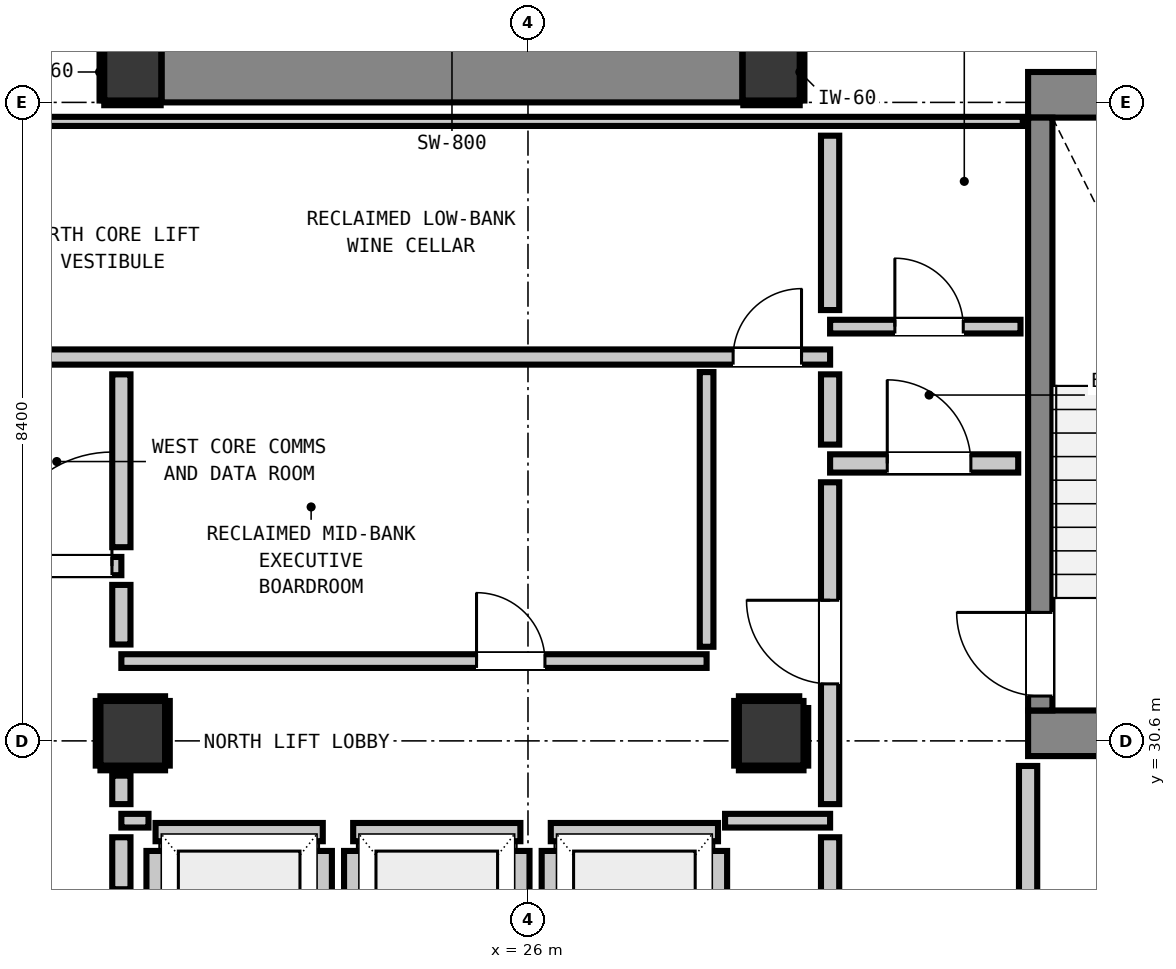
"""IFC4 building model, lengths in metres.
Left out: names, types, materials, properties, quantities, classifications, styles, units other than length and angle.
Written with IfcOpenShell. Run it as: python <this file> out.ifc"""

import sys

from ifc_helpers import new_model, si_unit, direction, frame, frame_2d, origin, origin_2d, place, context, subcontext, project, spatial, rectangle, extrude, element, fill, save


model = new_model("IFC4")
c1 = context("Model", 3, precision=1e-05, world=origin(), true_north=direction((0.0, 1.0)))
c2 = subcontext(c1, "Body", "Model", "MODEL_VIEW")
j1 = project(units=[si_unit("LENGTHUNIT", "METRE"), si_unit("PLANEANGLEUNIT", "RADIAN")], contexts=[c1])
p1 = place(None, origin())
s1 = spatial("IfcSite", under=j1, at=p1, CompositionType="ELEMENT")
p2 = place(p1, origin())
s2 = spatial("IfcBuilding", under=s1, at=p2, CompositionType="ELEMENT")
p3 = place(p2, frame((0.0, 0.0, 234.6)))
s3 = spatial("IfcBuildingStorey", under=s2, at=p3, CompositionType="ELEMENT", Elevation=234.6)
for number, where, z_axis, x_axis in (
    (1, (20.8, 39.4, 0.0), (0.0, 0.0, 1.0), (1.0, 0.0, 0.0)),
    (2, (29.2, 39.4, 0.0), (0.0, 0.0, 1.0), (1.0, 0.0, 0.0)),
):
    element("IfcColumn", number, at=place(p3, frame(where, z_axis=z_axis, x_axis=x_axis)), inside=s3, PredefinedType="COLUMN", context=c2, shape_type="SweptSolid", body=[
        extrude(rectangle(XDim=0.75, YDim=0.75, at=origin_2d()), origin(), (0.0, 0.0, 1.0), 3.32),
    ])
p4 = place(p3, frame((32.58, 39.1, 0.0), z_axis=(0.0, 0.0, 1.0), x_axis=(1.0, 0.0, 0.0)))
e3 = element("IfcWall", 3, at=p4, inside=s3, PredefinedType="SHEAR", context=c2, shape_type="SweptSolid", body=[
    extrude(rectangle(XDim=4.08, YDim=0.6, at=frame_2d((2.04, 0.0))), origin(), (0.0, 0.0, 1.0), 3.32),
])
p5 = place(p3, frame((32.58, 30.7, 0.0), z_axis=(0.0, 0.0, 1.0), x_axis=(1.0, 0.0, 0.0)))
e4 = element("IfcWall", 4, at=p5, inside=s3, PredefinedType="SHEAR", context=c2, shape_type="SweptSolid", body=[
    extrude(rectangle(XDim=3.54, YDim=0.6, at=frame_2d((1.77, 0.0))), origin(), (0.0, 0.0, 1.0), 3.32),
])
p6 = place(p3, frame((21.18, 39.4, 0.0), z_axis=(0.0, 0.0, 1.0), x_axis=(1.0, 0.0, 0.0)))
e5 = element("IfcWall", 5, at=p6, inside=s3, PredefinedType="SHEAR", context=c2, shape_type="SweptSolid", body=[
    extrude(rectangle(XDim=7.64, YDim=0.8, at=frame_2d((3.82, 0.0))), origin(), (0.0, 0.0, 1.0), 3.32),
])
p7 = place(p3, frame((32.74, 31.0, 0.0), z_axis=(0.0, 0.0, 1.0), x_axis=(0.0, 1.0, 0.0)))
e6 = element("IfcWall", 6, at=p7, inside=s3, PredefinedType="SHEAR", context=c2, shape_type="SweptSolid", body=[
    extrude(rectangle(XDim=7.8, YDim=0.32, at=frame_2d((3.9, 0.0))), origin(), (0.0, 0.0, 1.0), 3.32),
])
p8 = place(p7, frame((0.19, 0.0, 0.0)))
e7 = element("IfcOpeningElement", 7, at=p8, cuts=e6, PredefinedType="OPENING", context=c2, shape_type="SweptSolid", body=[
    extrude(rectangle(XDim=1.1, YDim=2.15, at=frame_2d((0.55, 1.075))), frame((0.0, 0.17, 0.0), z_axis=(0.0, -1.0, 0.0), x_axis=(1.0, 0.0, 0.0)), (0.0, 0.0, 1.0), 0.34),
])
for number, where, z_axis, x_axis in (
    (8, (20.8, 30.7, 0.0), (0.0, 0.0, 1.0), (1.0, 0.0, 0.0)),
    (9, (29.2, 30.7, 0.0), (0.0, 0.0, 1.0), (1.0, 0.0, 0.0)),
):
    element("IfcColumn", number, at=place(p3, frame(where, z_axis=z_axis, x_axis=x_axis)), inside=s3, PredefinedType="COLUMN", context=c2, shape_type="SweptSolid", body=[
        extrude(rectangle(XDim=0.85, YDim=0.85, at=origin_2d()), origin(), (0.0, 0.0, 1.0), 3.32),
    ])
p9 = place(p3, frame((21.1, 29.4, 0.0), z_axis=(0.0, 0.0, 1.0), x_axis=(1.0, 0.0, 0.0)))
e10 = element("IfcWall", 10, at=p9, inside=s3, PredefinedType="PARTITIONING", context=c2, shape_type="SweptSolid", body=[
    extrude(rectangle(XDim=2.2, YDim=0.24, at=frame_2d((1.1, 0.0))), origin(), (0.0, 0.0, 1.0), 3.1),
])
p10 = place(p3, frame((21.1, 27.048, 0.0), z_axis=(0.0, 0.0, 1.0), x_axis=(0.0, 1.0, 0.0)))
e11 = element("IfcWall", 11, at=p10, inside=s3, PredefinedType="PARTITIONING", context=c2, shape_type="SweptSolid", body=[
    extrude(rectangle(XDim=2.104, YDim=0.24, at=frame_2d((1.052, 0.0))), origin(), (0.0, 0.0, 1.0), 2.335),
])
p11 = place(p3, frame((23.3, 27.048, 0.0), z_axis=(0.0, 0.0, 1.0), x_axis=(0.0, 1.0, 0.0)))
e12 = element("IfcWall", 12, at=p11, inside=s3, PredefinedType="PARTITIONING", context=c2, shape_type="SweptSolid", body=[
    extrude(rectangle(XDim=2.104, YDim=0.24, at=frame_2d((1.052, 0.0))), origin(), (0.0, 0.0, 1.0), 3.1),
])
p12 = place(p3, frame((23.7, 29.4, 0.0), z_axis=(0.0, 0.0, 1.0), x_axis=(1.0, 0.0, 0.0)))
e13 = element("IfcWall", 13, at=p12, inside=s3, PredefinedType="PARTITIONING", context=c2, shape_type="SweptSolid", body=[
    extrude(rectangle(XDim=2.2, YDim=0.24, at=frame_2d((1.1, 0.0))), origin(), (0.0, 0.0, 1.0), 3.1),
])
for number, where, z_axis, x_axis in (
    (14, (23.7, 27.048, 0.0), (0.0, 0.0, 1.0), (0.0, 1.0, 0.0)),
    (15, (25.9, 27.048, 0.0), (0.0, 0.0, 1.0), (0.0, 1.0, 0.0)),
):
    element("IfcWall", number, at=place(p3, frame(where, z_axis=z_axis, x_axis=x_axis)), inside=s3, PredefinedType="PARTITIONING", context=c2, shape_type="SweptSolid", body=[
        extrude(rectangle(XDim=2.104, YDim=0.24, at=frame_2d((1.052, 0.0))), origin(), (0.0, 0.0, 1.0), 3.1),
    ])
p13 = place(p3, frame((26.3, 29.4, 0.0), z_axis=(0.0, 0.0, 1.0), x_axis=(1.0, 0.0, 0.0)))
e16 = element("IfcWall", 16, at=p13, inside=s3, PredefinedType="PARTITIONING", context=c2, shape_type="SweptSolid", body=[
    extrude(rectangle(XDim=2.2, YDim=0.24, at=frame_2d((1.1, 0.0))), origin(), (0.0, 0.0, 1.0), 3.1),
])
p14 = place(p3, frame((26.3, 27.048, 0.0), z_axis=(0.0, 0.0, 1.0), x_axis=(0.0, 1.0, 0.0)))
e17 = element("IfcWall", 17, at=p14, inside=s3, PredefinedType="PARTITIONING", context=c2, shape_type="SweptSolid", body=[
    extrude(rectangle(XDim=2.104, YDim=0.24, at=frame_2d((1.052, 0.0))), origin(), (0.0, 0.0, 1.0), 3.1),
])
p15 = place(p3, frame((28.5, 27.33, 0.0), z_axis=(0.0, 0.0, 1.0), x_axis=(0.0, 1.0, 0.0)))
e18 = element("IfcWall", 18, at=p15, inside=s3, PredefinedType="PARTITIONING", context=c2, shape_type="SweptSolid", body=[
    extrude(rectangle(XDim=1.822, YDim=0.24, at=frame_2d((0.911, 0.0))), origin(), (0.0, 0.0, 1.0), 3.1),
])
p16 = place(p3, frame((17.45, 32.9, 0.0), z_axis=(0.0, 0.0, 1.0), x_axis=(1.0, 0.0, 0.0)))
e19 = element("IfcWall", 19, at=p16, inside=s3, PredefinedType="PARTITIONING", context=c2, shape_type="SweptSolid", body=[
    extrude(rectangle(XDim=3.2, YDim=0.24, at=frame_2d((1.6, 0.0))), origin(), (0.0, 0.0, 1.0), 3.1),
])
p17 = place(p16, frame((0.159, 0.0, 0.0)))
e20 = element("IfcOpeningElement", 20, at=p17, cuts=e19, PredefinedType="OPENING", context=c2, shape_type="SweptSolid", body=[
    extrude(rectangle(XDim=1.1, YDim=2.15, at=frame_2d((0.55, 1.075))), frame((0.0, 0.13, 0.0), z_axis=(0.0, -1.0, 0.0), x_axis=(1.0, 0.0, 0.0)), (0.0, 0.0, 1.0), 0.26),
])
p18 = place(p16, frame((1.576, 0.0, 0.0)))
e21 = element("IfcOpeningElement", 21, at=p18, cuts=e19, PredefinedType="OPENING", context=c2, shape_type="SweptSolid", body=[
    extrude(rectangle(XDim=1.5, YDim=2.15, at=frame_2d((0.75, 1.075))), frame((0.0, 0.13, 0.0), z_axis=(0.0, -1.0, 0.0), x_axis=(1.0, 0.0, 0.0)), (0.0, 0.0, 1.0), 0.26),
])
p19 = place(p3, frame((29.975, 34.25, 0.0), z_axis=(0.0, 0.0, 1.0), x_axis=(1.0, 0.0, 0.0)))
e22 = element("IfcWall", 22, at=p19, inside=s3, PredefinedType="PARTITIONING", context=c2, shape_type="SweptSolid", body=[
    extrude(rectangle(XDim=2.475, YDim=0.24, at=frame_2d((1.237, 0.0))), origin(), (0.0, 0.0, 1.0), 3.1),
])
p20 = place(p19, frame((0.752, 0.0, 0.0)))
e23 = element("IfcOpeningElement", 23, at=p20, cuts=e22, PredefinedType="OPENING", context=c2, shape_type="SweptSolid", body=[
    extrude(rectangle(XDim=1.1, YDim=2.15, at=frame_2d((0.55, 1.075))), frame((0.0, 0.13, 0.0), z_axis=(0.0, -1.0, 0.0), x_axis=(1.0, 0.0, 0.0)), (0.0, 0.0, 1.0), 0.26),
])
p21 = place(p3, frame((18.95, 35.65, 0.0), z_axis=(0.0, 0.0, 1.0), x_axis=(1.0, 0.0, 0.0)))
e24 = element("IfcWall", 24, at=p21, inside=s3, PredefinedType="PARTITIONING", context=c2, shape_type="SweptSolid", body=[
    extrude(rectangle(XDim=11.025, YDim=0.2, at=frame_2d((5.513, 0.0))), origin(), (0.0, 0.0, 1.0), 3.1),
])
p22 = place(p21, frame((9.749, 0.0, 0.0)))
e25 = element("IfcOpeningElement", 25, at=p22, cuts=e24, PredefinedType="OPENING", context=c2, shape_type="SweptSolid", body=[
    extrude(rectangle(XDim=0.9, YDim=2.1, at=frame_2d((0.45, 1.05))), frame((0.0, 0.11, 0.0), z_axis=(0.0, -1.0, 0.0), x_axis=(1.0, 0.0, 0.0)), (0.0, 0.0, 1.0), 0.22),
])
p23 = place(p3, frame((20.65, 29.55, 0.0), z_axis=(0.0, 0.0, 1.0), x_axis=(1.0, 0.0, 0.0)))
e26 = element("IfcWall", 26, at=p23, inside=s3, PredefinedType="PARTITIONING", context=c2, shape_type="SweptSolid", body=[
    extrude(rectangle(XDim=0.357, YDim=0.18, at=frame_2d((0.179, 0.0))), origin(), (0.0, 0.0, 1.0), 3.1),
])
p24 = place(p3, frame((28.593, 29.55, 0.0), z_axis=(0.0, 0.0, 1.0), x_axis=(1.0, 0.0, 0.0)))
e27 = element("IfcWall", 27, at=p24, inside=s3, PredefinedType="PARTITIONING", context=c2, shape_type="SweptSolid", body=[
    extrude(rectangle(XDim=1.382, YDim=0.18, at=frame_2d((0.691, 0.0))), origin(), (0.0, 0.0, 1.0), 3.1),
])
p25 = place(p3, frame((20.65, 31.65, 0.0), z_axis=(0.0, 0.0, 1.0), x_axis=(1.0, 0.0, 0.0)))
e28 = element("IfcWall", 28, at=p25, inside=s3, PredefinedType="PARTITIONING", context=c2, shape_type="SweptSolid", body=[
    extrude(rectangle(XDim=7.7, YDim=0.18, at=frame_2d((3.85, 0.0))), origin(), (0.0, 0.0, 1.0), 3.1),
])
p26 = place(p25, frame((4.673, 0.0, 0.0)))
e29 = element("IfcOpeningElement", 29, at=p26, cuts=e28, PredefinedType="OPENING", context=c2, shape_type="SweptSolid", body=[
    extrude(rectangle(XDim=0.9, YDim=2.1, at=frame_2d((0.45, 1.05))), frame((0.0, 0.1, 0.0), z_axis=(0.0, -1.0, 0.0), x_axis=(1.0, 0.0, 0.0)), (0.0, 0.0, 1.0), 0.2),
])
p27 = place(p3, frame((29.975, 36.05, 0.0), z_axis=(0.0, 0.0, 1.0), x_axis=(1.0, 0.0, 0.0)))
e30 = element("IfcWall", 30, at=p27, inside=s3, PredefinedType="PARTITIONING", context=c2, shape_type="SweptSolid", body=[
    extrude(rectangle(XDim=2.505, YDim=0.18, at=frame_2d((1.252, 0.0))), origin(), (0.0, 0.0, 1.0), 3.1),
])
p28 = place(p27, frame((0.852, 0.0, 0.0)))
e31 = element("IfcOpeningElement", 31, at=p28, cuts=e30, PredefinedType="OPENING", context=c2, shape_type="SweptSolid", body=[
    extrude(rectangle(XDim=0.9, YDim=2.1, at=frame_2d((0.45, 1.05))), frame((0.0, 0.1, 0.0), z_axis=(0.0, -1.0, 0.0), x_axis=(1.0, 0.0, 0.0)), (0.0, 0.0, 1.0), 0.2),
])
p29 = place(p3, frame((18.95, 38.75, 0.0), z_axis=(0.0, 0.0, 1.0), x_axis=(1.0, 0.0, 0.0)))
e32 = element("IfcWall", 32, at=p29, inside=s3, PredefinedType="PARTITIONING", context=c2, shape_type="SweptSolid", body=[
    extrude(rectangle(XDim=13.56, YDim=0.12, at=frame_2d((6.78, 0.0))), origin(), (0.0, 0.0, 1.0), 3.1),
])
p30 = place(p3, frame((20.65, 28.648, 0.0), z_axis=(0.0, 0.0, 1.0), x_axis=(0.0, 1.0, 0.0)))
e33 = element("IfcWall", 33, at=p30, inside=s3, PredefinedType="PARTITIONING", context=c2, shape_type="SweptSolid", body=[
    extrude(rectangle(XDim=0.684, YDim=0.24, at=frame_2d((0.342, 0.0))), origin(), (0.0, 0.0, 1.0), 2.335),
])
p31 = place(p3, frame((20.65, 29.768, 0.0), z_axis=(0.0, 0.0, 1.0), x_axis=(0.0, 1.0, 0.0)))
e34 = element("IfcWall", 34, at=p31, inside=s3, PredefinedType="PARTITIONING", context=c2, shape_type="SweptSolid", body=[
    extrude(rectangle(XDim=0.375, YDim=0.24, at=frame_2d((0.188, 0.0))), origin(), (0.0, 0.0, 1.0), 2.335),
])
p32 = place(p3, frame((20.65, 31.868, 0.0), z_axis=(0.0, 0.0, 1.0), x_axis=(0.0, 1.0, 0.0)))
e35 = element("IfcWall", 35, at=p32, inside=s3, PredefinedType="PARTITIONING", context=c2, shape_type="SweptSolid", body=[
    extrude(rectangle(XDim=0.784, YDim=0.24, at=frame_2d((0.392, 0.0))), origin(), (0.0, 0.0, 1.0), 2.335),
])
p33 = place(p3, frame((20.65, 33.148, 0.0), z_axis=(0.0, 0.0, 1.0), x_axis=(0.0, 1.0, 0.0)))
e36 = element("IfcWall", 36, at=p33, inside=s3, PredefinedType="PARTITIONING", context=c2, shape_type="SweptSolid", body=[
    extrude(rectangle(XDim=2.274, YDim=0.24, at=frame_2d((1.137, 0.0))), origin(), (0.0, 0.0, 1.0), 2.335),
])
p34 = place(p3, frame((29.975, 25.648, 0.0), z_axis=(0.0, 0.0, 1.0), x_axis=(0.0, 1.0, 0.0)))
e37 = element("IfcWall", 37, at=p34, inside=s3, PredefinedType="PARTITIONING", context=c2, shape_type="SweptSolid", body=[
    extrude(rectangle(XDim=3.684, YDim=0.24, at=frame_2d((1.842, 0.0))), origin(), (0.0, 0.0, 1.0), 3.1),
])
p35 = place(p3, frame((29.975, 29.768, 0.0), z_axis=(0.0, 0.0, 1.0), x_axis=(0.0, 1.0, 0.0)))
e38 = element("IfcWall", 38, at=p35, inside=s3, PredefinedType="PARTITIONING", context=c2, shape_type="SweptSolid", body=[
    extrude(rectangle(XDim=4.234, YDim=0.24, at=frame_2d((2.117, 0.0))), origin(), (0.0, 0.0, 1.0), 3.1),
])
p36 = place(p35, frame((1.582, 0.0, 0.0)))
e39 = element("IfcOpeningElement", 39, at=p36, cuts=e38, PredefinedType="OPENING", context=c2, shape_type="SweptSolid", body=[
    extrude(rectangle(XDim=1.1, YDim=2.15, at=frame_2d((0.55, 1.075))), frame((0.0, 0.13, 0.0), z_axis=(0.0, -1.0, 0.0), x_axis=(1.0, 0.0, 0.0)), (0.0, 0.0, 1.0), 0.26),
])
p37 = place(p3, frame((29.975, 34.498, 0.0), z_axis=(0.0, 0.0, 1.0), x_axis=(0.0, 1.0, 0.0)))
e40 = element("IfcWall", 40, at=p37, inside=s3, PredefinedType="PARTITIONING", context=c2, shape_type="SweptSolid", body=[
    extrude(rectangle(XDim=0.924, YDim=0.24, at=frame_2d((0.462, 0.0))), origin(), (0.0, 0.0, 1.0), 3.1),
])
p38 = place(p3, frame((29.975, 36.268, 0.0), z_axis=(0.0, 0.0, 1.0), x_axis=(0.0, 1.0, 0.0)))
e41 = element("IfcWall", 41, at=p38, inside=s3, PredefinedType="PARTITIONING", context=c2, shape_type="SweptSolid", body=[
    extrude(rectangle(XDim=2.294, YDim=0.24, at=frame_2d((1.147, 0.0))), origin(), (0.0, 0.0, 1.0), 3.1),
])
p39 = place(p3, frame((32.58, 25.648, 0.0), z_axis=(0.0, 0.0, 1.0), x_axis=(0.0, 1.0, 0.0)))
e42 = element("IfcWall", 42, at=p39, inside=s3, PredefinedType="PARTITIONING", context=c2, shape_type="SweptSolid", body=[
    extrude(rectangle(XDim=4.622, YDim=0.24, at=frame_2d((2.311, 0.0))), origin(), (0.0, 0.0, 1.0), 3.1),
])
p40 = place(p3, frame((28.35, 31.838, 0.0), z_axis=(0.0, 0.0, 1.0), x_axis=(0.0, 1.0, 0.0)))
e43 = element("IfcWall", 43, at=p40, inside=s3, PredefinedType="PARTITIONING", context=c2, shape_type="SweptSolid", body=[
    extrude(rectangle(XDim=3.614, YDim=0.18, at=frame_2d((1.807, 0.0))), origin(), (0.0, 0.0, 1.0), 3.1),
])
p41 = place(p3, frame((20.425, 38.993, 0.0), z_axis=(0.0, 0.0, 1.0), x_axis=(1.0, 0.0, 0.0)))
e44 = element("IfcWall", 44, at=p41, inside=s3, PredefinedType="PARTITIONING", context=c2, shape_type="SweptSolid", body=[
    extrude(rectangle(XDim=0.742, YDim=0.06, at=frame_2d((0.371, 0.0))), origin(), (0.0, 0.0, 1.0), 1.45),
])
p42 = place(p3, frame((20.393, 39.025, 0.0), z_axis=(0.0, 0.0, 1.0), x_axis=(0.0, 1.0, 0.0)))
e45 = element("IfcWall", 45, at=p42, inside=s3, PredefinedType="PARTITIONING", context=c2, shape_type="SweptSolid", body=[
    extrude(rectangle(XDim=0.75, YDim=0.06, at=frame_2d((0.375, 0.0))), origin(), (0.0, 0.0, 1.0), 1.45),
])
p43 = place(p3, frame((28.833, 38.993, 0.0), z_axis=(0.0, 0.0, 1.0), x_axis=(1.0, 0.0, 0.0)))
e46 = element("IfcWall", 46, at=p43, inside=s3, PredefinedType="PARTITIONING", context=c2, shape_type="SweptSolid", body=[
    extrude(rectangle(XDim=0.742, YDim=0.06, at=frame_2d((0.371, 0.0))), origin(), (0.0, 0.0, 1.0), 1.45),
])
p44 = place(p3, frame((29.607, 39.025, 0.0), z_axis=(0.0, 0.0, 1.0), x_axis=(0.0, 1.0, 0.0)))
e47 = element("IfcWall", 47, at=p44, inside=s3, PredefinedType="PARTITIONING", context=c2, shape_type="SweptSolid", body=[
    extrude(rectangle(XDim=0.75, YDim=0.06, at=frame_2d((0.375, 0.0))), origin(), (0.0, 0.0, 1.0), 1.45),
])
for number, where, z_axis, x_axis in (
    (48, (20.375, 30.243, 0.0), (0.0, 0.0, 1.0), (1.0, 0.0, 0.0)),
    (49, (20.375, 31.157, 0.0), (0.0, 0.0, 1.0), (1.0, 0.0, 0.0)),
    (50, (20.343, 30.275, 0.0), (0.0, 0.0, 1.0), (0.0, 1.0, 0.0)),
    (51, (21.257, 30.275, 0.0), (0.0, 0.0, 1.0), (0.0, 1.0, 0.0)),
    (52, (28.775, 30.243, 0.0), (0.0, 0.0, 1.0), (1.0, 0.0, 0.0)),
):
    element("IfcWall", number, at=place(p3, frame(where, z_axis=z_axis, x_axis=x_axis)), inside=s3, PredefinedType="PARTITIONING", context=c2, shape_type="SweptSolid", body=[
        extrude(rectangle(XDim=0.85, YDim=0.06, at=frame_2d((0.425, 0.0))), origin(), (0.0, 0.0, 1.0), 1.45),
    ])
p45 = place(p3, frame((28.775, 31.157, 0.0), z_axis=(0.0, 0.0, 1.0), x_axis=(1.0, 0.0, 0.0)))
e53 = element("IfcWall", 53, at=p45, inside=s3, PredefinedType="PARTITIONING", context=c2, shape_type="SweptSolid", body=[
    extrude(rectangle(XDim=0.794, YDim=0.06, at=frame_2d((0.397, 0.0))), origin(), (0.0, 0.0, 1.0), 1.45),
])
p46 = place(p3, frame((28.743, 30.275, 0.0), z_axis=(0.0, 0.0, 1.0), x_axis=(0.0, 1.0, 0.0)))
e54 = element("IfcWall", 54, at=p46, inside=s3, PredefinedType="PARTITIONING", context=c2, shape_type="SweptSolid", body=[
    extrude(rectangle(XDim=0.85, YDim=0.06, at=frame_2d((0.425, 0.0))), origin(), (0.0, 0.0, 1.0), 1.45),
])
p47 = place(p3, frame((29.657, 30.275, 0.0), z_axis=(0.0, 0.0, 1.0), x_axis=(0.0, 1.0, 0.0)))
e55 = element("IfcWall", 55, at=p47, inside=s3, PredefinedType="PARTITIONING", context=c2, shape_type="SweptSolid", body=[
    extrude(rectangle(XDim=0.757, YDim=0.06, at=frame_2d((0.378, 0.0))), origin(), (0.0, 0.0, 1.0), 1.45),
])
p48 = place(p8, origin())
e56 = element("IfcDoor", 56, at=p48, inside=s3, OperationType="SINGLE_SWING_RIGHT", PredefinedType="DOOR", context=c2, shape_type="SweptSolid", body=[
    extrude(rectangle(XDim=1.1, YDim=2.15, at=frame_2d((0.55, 1.075))), frame((0.0, 0.025, 0.0), z_axis=(0.0, -1.0, 0.0), x_axis=(1.0, 0.0, 0.0)), (0.0, 0.0, 1.0), 0.05),
])
fill(e7, e56)
p49 = place(p36, origin())
e57 = element("IfcDoor", 57, at=p49, inside=s3, OperationType="SINGLE_SWING_RIGHT", PredefinedType="DOOR", context=c2, shape_type="SweptSolid", body=[
    extrude(rectangle(XDim=1.1, YDim=2.15, at=frame_2d((0.55, 1.075))), frame((0.0, 0.025, 0.0), z_axis=(0.0, -1.0, 0.0), x_axis=(1.0, 0.0, 0.0)), (0.0, 0.0, 1.0), 0.05),
])
fill(e39, e57)
p50 = place(p20, origin())
e58 = element("IfcDoor", 58, at=p50, inside=s3, OperationType="SINGLE_SWING_LEFT", PredefinedType="DOOR", context=c2, shape_type="SweptSolid", body=[
    extrude(rectangle(XDim=1.1, YDim=2.15, at=frame_2d((0.55, 1.075))), frame((0.0, 0.025, 0.0), z_axis=(0.0, -1.0, 0.0), x_axis=(1.0, 0.0, 0.0)), (0.0, 0.0, 1.0), 0.05),
])
fill(e23, e58)
p51 = place(p18, origin())
e59 = element("IfcDoor", 59, at=p51, inside=s3, OperationType="SINGLE_SWING_RIGHT", PredefinedType="DOOR", context=c2, shape_type="SweptSolid", body=[
    extrude(rectangle(XDim=1.5, YDim=2.15, at=frame_2d((0.75, 1.075))), frame((0.0, 0.025, 0.0), z_axis=(0.0, -1.0, 0.0), x_axis=(1.0, 0.0, 0.0)), (0.0, 0.0, 1.0), 0.05),
])
fill(e21, e59)
p52 = place(p28, origin())
e60 = element("IfcDoor", 60, at=p52, inside=s3, OperationType="SINGLE_SWING_LEFT", PredefinedType="DOOR", context=c2, shape_type="SweptSolid", body=[
    extrude(rectangle(XDim=0.9, YDim=2.1, at=frame_2d((0.45, 1.05))), frame((0.0, 0.025, 0.0), z_axis=(0.0, -1.0, 0.0), x_axis=(1.0, 0.0, 0.0)), (0.0, 0.0, 1.0), 0.05),
])
fill(e31, e60)
p53 = place(p22, origin())
e61 = element("IfcDoor", 61, at=p53, inside=s3, OperationType="SINGLE_SWING_RIGHT", PredefinedType="DOOR", context=c2, shape_type="SweptSolid", body=[
    extrude(rectangle(XDim=0.9, YDim=2.1, at=frame_2d((0.45, 1.05))), frame((0.0, 0.025, 0.0), z_axis=(0.0, -1.0, 0.0), x_axis=(1.0, 0.0, 0.0)), (0.0, 0.0, 1.0), 0.05),
])
fill(e25, e61)
p54 = place(p26, origin())
e62 = element("IfcDoor", 62, at=p54, inside=s3, OperationType="SINGLE_SWING_LEFT", PredefinedType="DOOR", context=c2, shape_type="SweptSolid", body=[
    extrude(rectangle(XDim=0.9, YDim=2.1, at=frame_2d((0.45, 1.05))), frame((0.0, 0.025, 0.0), z_axis=(0.0, -1.0, 0.0), x_axis=(1.0, 0.0, 0.0)), (0.0, 0.0, 1.0), 0.05),
])
fill(e29, e62)
save(model, sys.argv[1])
